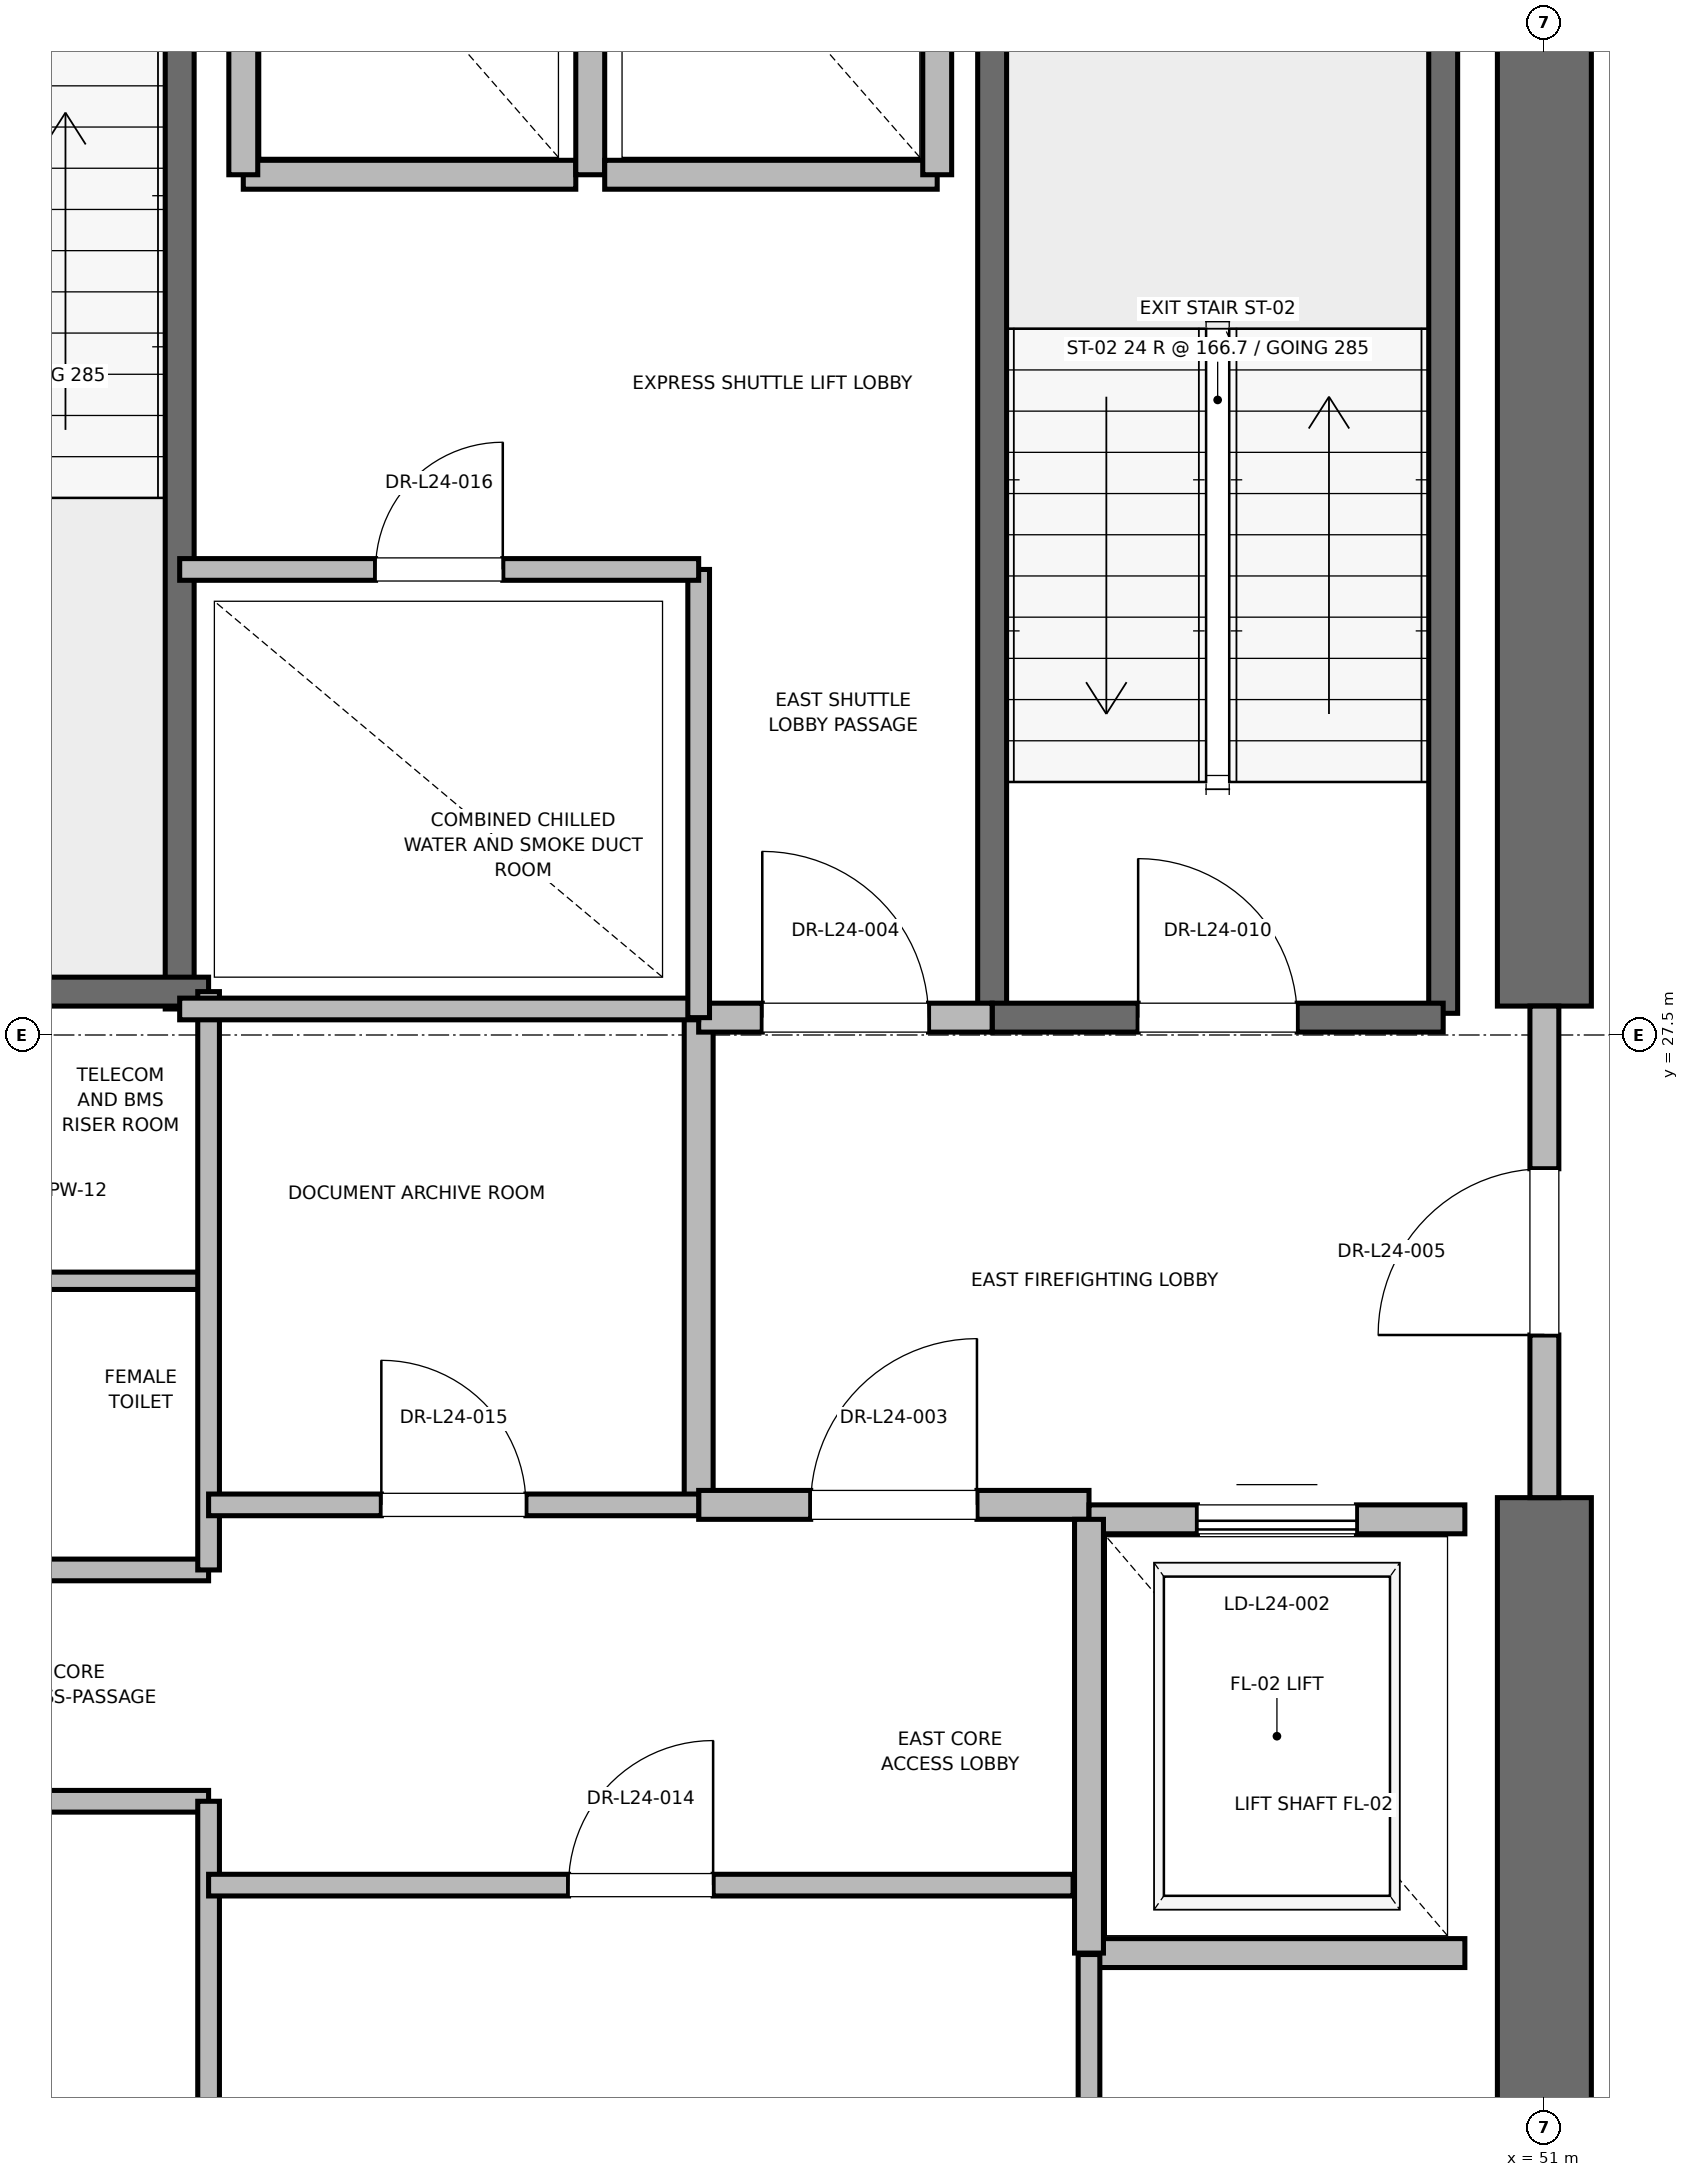
"""IFC4 building model, lengths in metres.
Left out: names, types, materials, properties, quantities, classifications, styles, units other than length and angle.
Written with IfcOpenShell. Run it as: python <this file> out.ifc"""

import sys

from ifc_helpers import new_model, si_unit, direction, frame, frame_2d, origin, place, context, subcontext, project, spatial, rectangle, extrude, element, fill, save


model = new_model("IFC4")
c1 = context("Model", 3, precision=1e-05, world=origin(), true_north=direction((0.0, 1.0)))
c2 = subcontext(c1, "Body", "Model", "MODEL_VIEW")
j1 = project(units=[si_unit("LENGTHUNIT", "METRE"), si_unit("PLANEANGLEUNIT", "RADIAN")], contexts=[c1])
p1 = place(None, origin())
s1 = spatial("IfcSite", under=j1, at=p1, CompositionType="ELEMENT")
p2 = place(p1, origin())
s2 = spatial("IfcBuilding", under=s1, at=p2, CompositionType="ELEMENT")
p3 = place(p2, frame((0.0, 0.0, 103.6)))
s3 = spatial("IfcBuildingStorey", under=s2, at=p3, CompositionType="ELEMENT", Elevation=103.6)
p4 = place(p3, frame((51.0, 18.5, 0.0), z_axis=(0.0, 0.0, 1.0), x_axis=(0.0, 1.0, 0.0)))
e1 = element("IfcWall", 1, at=p4, inside=s3, PredefinedType="SHEAR", context=c2, shape_type="SweptSolid", body=[
    extrude(rectangle(XDim=5.8, YDim=0.65, at=frame_2d((2.9, 0.0))), origin(), (0.0, 0.0, 1.0), 3.7),
])
p5 = place(p3, frame((51.0, 27.7, 0.0), z_axis=(0.0, 0.0, 1.0), x_axis=(0.0, 1.0, 0.0)))
e2 = element("IfcWall", 2, at=p5, inside=s3, PredefinedType="SHEAR", context=c2, shape_type="SweptSolid", body=[
    extrude(rectangle(XDim=8.8, YDim=0.65, at=frame_2d((4.4, 0.0))), origin(), (0.0, 0.0, 1.0), 3.7),
])
p6 = place(p3, frame((50.3, 27.65, 0.0), z_axis=(0.0, 0.0, 1.0), x_axis=(0.0, 1.0, 0.0)))
e3 = element("IfcWall", 3, at=p6, inside=s3, PredefinedType="SOLIDWALL", context=c2, shape_type="SweptSolid", body=[
    extrude(rectangle(XDim=8.15, YDim=0.2, at=frame_2d((4.075, 0.0))), origin(), (0.0, 0.0, 1.0), 3.7),
])
p7 = place(p3, frame((47.18, 27.62, 0.0), z_axis=(0.0, 0.0, 1.0), x_axis=(0.0, 1.0, 0.0)))
e4 = element("IfcWall", 4, at=p7, inside=s3, PredefinedType="SOLIDWALL", context=c2, shape_type="SweptSolid", body=[
    extrude(rectangle(XDim=8.18, YDim=0.2, at=frame_2d((4.09, 0.0))), origin(), (0.0, 0.0, 1.0), 3.7),
])
p8 = place(p3, frame((47.18, 27.62, 0.0), z_axis=(0.0, 0.0, 1.0), x_axis=(1.0, 0.0, 0.0)))
e5 = element("IfcWall", 5, at=p8, inside=s3, PredefinedType="SOLIDWALL", context=c2, shape_type="SweptSolid", body=[
    extrude(rectangle(XDim=3.12, YDim=0.2, at=frame_2d((1.56, 0.0))), origin(), (0.0, 0.0, 1.0), 3.7),
])
p9 = place(p8, frame((1.01, 0.0, 0.0)))
e6 = element("IfcOpeningElement", 6, at=p9, cuts=e5, PredefinedType="OPENING", context=c2, shape_type="SweptSolid", body=[
    extrude(rectangle(XDim=1.1, YDim=2.15, at=frame_2d((0.55, 1.075))), frame((0.0, 0.1, 0.0), z_axis=(0.0, -1.0, 0.0), x_axis=(1.0, 0.0, 0.0)), (0.0, 0.0, 1.0), 0.2),
])
p10 = place(p3, frame((41.56, 27.68, 0.0), z_axis=(0.0, 0.0, 1.0), x_axis=(0.0, 1.0, 0.0)))
e7 = element("IfcWall", 7, at=p10, inside=s3, PredefinedType="SOLIDWALL", context=c2, shape_type="SweptSolid", body=[
    extrude(rectangle(XDim=8.57, YDim=0.2, at=frame_2d((4.285, 0.0))), origin(), (0.0, 0.0, 1.0), 3.7),
])
p11 = place(p3, frame((38.44, 27.8, 0.0), z_axis=(0.0, 0.0, 1.0), x_axis=(1.0, 0.0, 0.0)))
e8 = element("IfcWall", 8, at=p11, inside=s3, PredefinedType="SOLIDWALL", context=c2, shape_type="SweptSolid", body=[
    extrude(rectangle(XDim=3.32, YDim=0.2, at=frame_2d((1.66, 0.0))), origin(), (0.0, 0.0, 1.0), 3.7),
])
p12 = place(p3, frame((45.15, 24.25, 0.0), z_axis=(0.0, 0.0, 1.0), x_axis=(0.0, 1.0, 0.0)))
e9 = element("IfcWall", 9, at=p12, inside=s3, PredefinedType="PARTITIONING", context=c2, shape_type="SweptSolid", body=[
    extrude(rectangle(XDim=3.37, YDim=0.2, at=frame_2d((1.685, 0.0))), origin(), (0.0, 0.0, 1.0), 3.7),
])
p13 = place(p3, frame((45.15, 24.25, 0.0), z_axis=(0.0, 0.0, 1.0), x_axis=(1.0, 0.0, 0.0)))
e10 = element("IfcWall", 10, at=p13, inside=s3, PredefinedType="PARTITIONING", context=c2, shape_type="SweptSolid", body=[
    extrude(rectangle(XDim=2.7, YDim=0.2, at=frame_2d((1.35, 0.0))), origin(), (0.0, 0.0, 1.0), 3.7),
])
p14 = place(p13, frame((0.775, 0.0, 0.0)))
e11 = element("IfcOpeningElement", 11, at=p14, cuts=e10, PredefinedType="OPENING", context=c2, shape_type="SweptSolid", body=[
    extrude(rectangle(XDim=1.15, YDim=2.2, at=frame_2d((0.575, 1.1))), frame((0.0, 0.1, 0.0), z_axis=(0.0, -1.0, 0.0), x_axis=(1.0, 0.0, 0.0)), (0.0, 0.0, 1.0), 0.2),
])
p15 = place(p3, frame((45.15, 27.62, 0.0), z_axis=(0.0, 0.0, 1.0), x_axis=(1.0, 0.0, 0.0)))
e12 = element("IfcWall", 12, at=p15, inside=s3, PredefinedType="PARTITIONING", context=c2, shape_type="SweptSolid", body=[
    extrude(rectangle(XDim=2.03, YDim=0.2, at=frame_2d((1.015, 0.0))), origin(), (0.0, 0.0, 1.0), 3.7),
])
p16 = place(p15, frame((0.44, 0.0, 0.0)))
e13 = element("IfcOpeningElement", 13, at=p16, cuts=e12, PredefinedType="OPENING", context=c2, shape_type="SweptSolid", body=[
    extrude(rectangle(XDim=1.15, YDim=2.2, at=frame_2d((0.575, 1.1))), frame((0.0, 0.1, 0.0), z_axis=(0.0, -1.0, 0.0), x_axis=(1.0, 0.0, 0.0)), (0.0, 0.0, 1.0), 0.2),
])
p17 = place(p3, frame((51.0, 24.3, 0.0), z_axis=(0.0, 0.0, 1.0), x_axis=(0.0, 1.0, 0.0)))
e14 = element("IfcWall", 14, at=p17, inside=s3, PredefinedType="PARTITIONING", context=c2, shape_type="SweptSolid", body=[
    extrude(rectangle(XDim=3.4, YDim=0.2, at=frame_2d((1.7, 0.0))), origin(), (0.0, 0.0, 1.0), 2.48),
])
p18 = place(p17, frame((1.125, 0.0, 0.0)))
e15 = element("IfcOpeningElement", 15, at=p18, cuts=e14, PredefinedType="OPENING", context=c2, shape_type="SweptSolid", body=[
    extrude(rectangle(XDim=1.15, YDim=2.2, at=frame_2d((0.575, 1.1))), frame((0.0, 0.1, 0.0), z_axis=(0.0, -1.0, 0.0), x_axis=(1.0, 0.0, 0.0)), (0.0, 0.0, 1.0), 0.2),
])
p19 = place(p3, frame((47.85, 21.15, 0.0), z_axis=(0.0, 0.0, 1.0), x_axis=(1.0, 0.0, 0.0)))
e16 = element("IfcWall", 16, at=p19, inside=s3, PredefinedType="SOLIDWALL", context=c2, shape_type="SweptSolid", body=[
    extrude(rectangle(XDim=2.6, YDim=0.2, at=frame_2d((1.3, 0.0))), origin(), (0.0, 0.0, 1.0), 3.7),
])
p20 = place(p3, frame((50.45, 24.15, 0.0), z_axis=(0.0, 0.0, 1.0), x_axis=(-1.0, 0.0, 0.0)))
e17 = element("IfcWall", 17, at=p20, inside=s3, PredefinedType="SOLIDWALL", context=c2, shape_type="SweptSolid", body=[
    extrude(rectangle(XDim=2.6, YDim=0.2, at=frame_2d((1.3, 0.0))), origin(), (0.0, 0.0, 1.0), 2.48),
])
p21 = place(p20, frame((0.75, 0.0, 0.0)))
e18 = element("IfcOpeningElement", 18, at=p21, cuts=e17, PredefinedType="OPENING", context=c2, shape_type="SweptSolid", body=[
    extrude(rectangle(XDim=1.1, YDim=2.2, at=frame_2d((0.55, 1.1))), frame((0.0, 0.1, 0.0), z_axis=(0.0, -1.0, 0.0), x_axis=(1.0, 0.0, 0.0)), (0.0, 0.0, 1.0), 0.2),
])
p22 = place(p3, frame((47.85, 24.15, 0.0), z_axis=(0.0, 0.0, 1.0), x_axis=(0.0, -1.0, 0.0)))
e19 = element("IfcWall", 19, at=p22, inside=s3, PredefinedType="SOLIDWALL", context=c2, shape_type="SweptSolid", body=[
    extrude(rectangle(XDim=3.0, YDim=0.2, at=frame_2d((1.5, 0.0))), origin(), (0.0, 0.0, 1.0), 3.7),
])
p23 = place(p3, frame((42.0, 33.45, 0.0), z_axis=(0.0, 0.0, 1.0), x_axis=(1.0, 0.0, 0.0)))
e20 = element("IfcWall", 20, at=p23, inside=s3, PredefinedType="SOLIDWALL", context=c2, shape_type="SweptSolid", body=[
    extrude(rectangle(XDim=2.3, YDim=0.2, at=frame_2d((1.15, 0.0))), origin(), (0.0, 0.0, 1.0), 3.7),
])
for number, where, z_axis, x_axis in (
    (21, (42.0, 36.05, 0.0), (0.0, 0.0, 1.0), (0.0, -1.0, 0.0)),
    (22, (44.4, 33.45, 0.0), (0.0, 0.0, 1.0), (0.0, 1.0, 0.0)),
):
    element("IfcWall", number, at=place(p3, frame(where, z_axis=z_axis, x_axis=x_axis)), inside=s3, PredefinedType="SOLIDWALL", context=c2, shape_type="SweptSolid", body=[
        extrude(rectangle(XDim=2.6, YDim=0.2, at=frame_2d((1.3, 0.0))), origin(), (0.0, 0.0, 1.0), 2.48),
    ])
p24 = place(p3, frame((44.5, 33.45, 0.0), z_axis=(0.0, 0.0, 1.0), x_axis=(1.0, 0.0, 0.0)))
e23 = element("IfcWall", 23, at=p24, inside=s3, PredefinedType="SOLIDWALL", context=c2, shape_type="SweptSolid", body=[
    extrude(rectangle(XDim=2.3, YDim=0.2, at=frame_2d((1.15, 0.0))), origin(), (0.0, 0.0, 1.0), 3.7),
])
p25 = place(p3, frame((46.8, 33.45, 0.0), z_axis=(0.0, 0.0, 1.0), x_axis=(0.0, 1.0, 0.0)))
e24 = element("IfcWall", 24, at=p25, inside=s3, PredefinedType="SOLIDWALL", context=c2, shape_type="SweptSolid", body=[
    extrude(rectangle(XDim=2.6, YDim=0.2, at=frame_2d((1.3, 0.0))), origin(), (0.0, 0.0, 1.0), 3.7),
])
for number, where, z_axis, x_axis in (
    (25, (39.95, 22.2, 0.0), (0.0, 0.0, 1.0), (1.0, 0.0, 0.0)),
    (26, (39.95, 23.8, 0.0), (0.0, 0.0, 1.0), (1.0, 0.0, 0.0)),
):
    element("IfcWall", number, at=place(p3, frame(where, z_axis=z_axis, x_axis=x_axis)), inside=s3, PredefinedType="PARTITIONING", context=c2, shape_type="SweptSolid", body=[
        extrude(rectangle(XDim=1.81, YDim=0.15, at=frame_2d((0.905, 0.0))), origin(), (0.0, 0.0, 1.0), 2.85),
    ])
p26 = place(p3, frame((39.95, 25.8, 0.0), z_axis=(0.0, 0.0, 1.0), x_axis=(1.0, 0.0, 0.0)))
e27 = element("IfcWall", 27, at=p26, inside=s3, PredefinedType="PARTITIONING", context=c2, shape_type="SweptSolid", body=[
    extrude(rectangle(XDim=1.81, YDim=0.12, at=frame_2d((0.905, 0.0))), origin(), (0.0, 0.0, 1.0), 2.85),
])
p27 = place(p3, frame((41.76, 18.6, 0.0), z_axis=(0.0, 0.0, 1.0), x_axis=(0.0, 1.0, 0.0)))
e28 = element("IfcWall", 28, at=p27, inside=s3, PredefinedType="PARTITIONING", context=c2, shape_type="SweptSolid", body=[
    extrude(rectangle(XDim=3.6, YDim=0.15, at=frame_2d((1.8, 0.0))), origin(), (0.0, 0.0, 1.0), 2.48),
])
p28 = place(p3, frame((41.76, 23.8, 0.0), z_axis=(0.0, 0.0, 1.0), x_axis=(0.0, 1.0, 0.0)))
e29 = element("IfcWall", 29, at=p28, inside=s3, PredefinedType="PARTITIONING", context=c2, shape_type="SweptSolid", body=[
    extrude(rectangle(XDim=4.0, YDim=0.15, at=frame_2d((2.0, 0.0))), origin(), (0.0, 0.0, 1.0), 2.85),
])
p29 = place(p3, frame((41.56, 27.68, 0.0), z_axis=(0.0, 0.0, 1.0), x_axis=(1.0, 0.0, 0.0)))
e30 = element("IfcWall", 30, at=p29, inside=s3, PredefinedType="PARTITIONING", context=c2, shape_type="SweptSolid", body=[
    extrude(rectangle(XDim=3.59, YDim=0.15, at=frame_2d((1.795, 0.0))), origin(), (0.0, 0.0, 1.0), 2.85),
])
p30 = place(p3, frame((47.85, 18.6, 0.0), z_axis=(0.0, 0.0, 1.0), x_axis=(0.0, 1.0, 0.0)))
e31 = element("IfcWall", 31, at=p30, inside=s3, PredefinedType="PARTITIONING", context=c2, shape_type="SweptSolid", body=[
    extrude(rectangle(XDim=2.54, YDim=0.15, at=frame_2d((1.27, 0.0))), origin(), (0.0, 0.0, 1.0), 2.85),
])
p31 = place(p3, frame((41.76, 21.62, 0.0), z_axis=(0.0, 0.0, 1.0), x_axis=(1.0, 0.0, 0.0)))
e32 = element("IfcWall", 32, at=p31, inside=s3, PredefinedType="PARTITIONING", context=c2, shape_type="SweptSolid", body=[
    extrude(rectangle(XDim=5.98, YDim=0.15, at=frame_2d((2.99, 0.0))), origin(), (0.0, 0.0, 1.0), 2.85),
])
p32 = place(p31, frame((2.49, 0.0, 0.0)))
e33 = element("IfcOpeningElement", 33, at=p32, cuts=e32, PredefinedType="OPENING", context=c2, shape_type="SweptSolid", body=[
    extrude(rectangle(XDim=1.0, YDim=2.15, at=frame_2d((0.5, 1.075))), frame((0.0, 0.075, 0.0), z_axis=(0.0, -1.0, 0.0), x_axis=(1.0, 0.0, 0.0)), (0.0, 0.0, 1.0), 0.15),
])
p33 = place(p3, frame((41.76, 24.25, 0.0), z_axis=(0.0, 0.0, 1.0), x_axis=(1.0, 0.0, 0.0)))
e34 = element("IfcWall", 34, at=p33, inside=s3, PredefinedType="PARTITIONING", context=c2, shape_type="SweptSolid", body=[
    extrude(rectangle(XDim=3.39, YDim=0.15, at=frame_2d((1.695, 0.0))), origin(), (0.0, 0.0, 1.0), 2.85),
])
p34 = place(p33, frame((1.195, 0.0, 0.0)))
e35 = element("IfcOpeningElement", 35, at=p34, cuts=e34, PredefinedType="OPENING", context=c2, shape_type="SweptSolid", body=[
    extrude(rectangle(XDim=1.0, YDim=2.15, at=frame_2d((0.5, 1.075))), frame((0.0, 0.075, 0.0), z_axis=(0.0, -1.0, 0.0), x_axis=(1.0, 0.0, 0.0)), (0.0, 0.0, 1.0), 0.15),
])
p35 = place(p3, frame((45.15, 27.62, 0.0), z_axis=(0.0, 0.0, 1.0), x_axis=(0.0, 1.0, 0.0)))
e36 = element("IfcWall", 36, at=p35, inside=s3, PredefinedType="PARTITIONING", context=c2, shape_type="SweptSolid", body=[
    extrude(rectangle(XDim=3.1, YDim=0.15, at=frame_2d((1.55, 0.0))), origin(), (0.0, 0.0, 1.0), 2.85),
])
p36 = place(p3, frame((41.56, 30.72, 0.0), z_axis=(0.0, 0.0, 1.0), x_axis=(1.0, 0.0, 0.0)))
e37 = element("IfcWall", 37, at=p36, inside=s3, PredefinedType="PARTITIONING", context=c2, shape_type="SweptSolid", body=[
    extrude(rectangle(XDim=3.59, YDim=0.15, at=frame_2d((1.795, 0.0))), origin(), (0.0, 0.0, 1.0), 2.85),
])
p37 = place(p36, frame((1.355, 0.0, 0.0)))
e38 = element("IfcOpeningElement", 38, at=p37, cuts=e37, PredefinedType="OPENING", context=c2, shape_type="SweptSolid", body=[
    extrude(rectangle(XDim=0.88, YDim=2.1, at=frame_2d((0.44, 1.05))), frame((0.0, 0.075, 0.0), z_axis=(0.0, -1.0, 0.0), x_axis=(1.0, 0.0, 0.0)), (0.0, 0.0, 1.0), 0.15),
])
p38 = place(p9, origin())
e39 = element("IfcDoor", 39, at=p38, inside=s3, OperationType="SINGLE_SWING_LEFT", PredefinedType="DOOR", context=c2, shape_type="SweptSolid", body=[
    extrude(rectangle(XDim=1.1, YDim=2.15, at=frame_2d((0.55, 1.075))), frame((0.0, 0.025, 0.0), z_axis=(0.0, -1.0, 0.0), x_axis=(1.0, 0.0, 0.0)), (0.0, 0.0, 1.0), 0.05),
])
fill(e6, e39)
p39 = place(p14, origin())
e40 = element("IfcDoor", 40, at=p39, inside=s3, OperationType="SINGLE_SWING_RIGHT", PredefinedType="DOOR", context=c2, shape_type="SweptSolid", body=[
    extrude(rectangle(XDim=1.15, YDim=2.2, at=frame_2d((0.575, 1.1))), frame((0.0, 0.025, 0.0), z_axis=(0.0, -1.0, 0.0), x_axis=(1.0, 0.0, 0.0)), (0.0, 0.0, 1.0), 0.05),
])
fill(e11, e40)
p40 = place(p16, origin())
e41 = element("IfcDoor", 41, at=p40, inside=s3, OperationType="SINGLE_SWING_LEFT", PredefinedType="DOOR", context=c2, shape_type="SweptSolid", body=[
    extrude(rectangle(XDim=1.15, YDim=2.2, at=frame_2d((0.575, 1.1))), frame((0.0, 0.025, 0.0), z_axis=(0.0, -1.0, 0.0), x_axis=(1.0, 0.0, 0.0)), (0.0, 0.0, 1.0), 0.05),
])
fill(e13, e41)
p41 = place(p18, origin())
e42 = element("IfcDoor", 42, at=p41, inside=s3, OperationType="SINGLE_SWING_LEFT", PredefinedType="DOOR", context=c2, shape_type="SweptSolid", body=[
    extrude(rectangle(XDim=1.15, YDim=2.2, at=frame_2d((0.575, 1.1))), frame((0.0, 0.025, 0.0), z_axis=(0.0, -1.0, 0.0), x_axis=(1.0, 0.0, 0.0)), (0.0, 0.0, 1.0), 0.05),
])
fill(e15, e42)
p42 = place(p21, origin())
e43 = element("IfcDoor", 43, at=p42, inside=s3, OperationType="SLIDING_TO_RIGHT", PredefinedType="DOOR", context=c2, shape_type="SweptSolid", body=[
    extrude(rectangle(XDim=1.1, YDim=2.2, at=frame_2d((0.55, 1.1))), frame((0.0, 0.025, 0.0), z_axis=(0.0, -1.0, 0.0), x_axis=(1.0, 0.0, 0.0)), (0.0, 0.0, 1.0), 0.05),
])
fill(e18, e43)
p43 = place(p32, origin())
e44 = element("IfcDoor", 44, at=p43, inside=s3, OperationType="SINGLE_SWING_RIGHT", PredefinedType="DOOR", context=c2, shape_type="SweptSolid", body=[
    extrude(rectangle(XDim=1.0, YDim=2.15, at=frame_2d((0.5, 1.075))), frame((0.0, 0.025, 0.0), z_axis=(0.0, -1.0, 0.0), x_axis=(1.0, 0.0, 0.0)), (0.0, 0.0, 1.0), 0.05),
])
fill(e33, e44)
p44 = place(p34, origin())
e45 = element("IfcDoor", 45, at=p44, inside=s3, OperationType="SINGLE_SWING_LEFT", PredefinedType="DOOR", context=c2, shape_type="SweptSolid", body=[
    extrude(rectangle(XDim=1.0, YDim=2.15, at=frame_2d((0.5, 1.075))), frame((0.0, 0.025, 0.0), z_axis=(0.0, -1.0, 0.0), x_axis=(1.0, 0.0, 0.0)), (0.0, 0.0, 1.0), 0.05),
])
fill(e35, e45)
p45 = place(p37, origin())
e46 = element("IfcDoor", 46, at=p45, inside=s3, OperationType="SINGLE_SWING_RIGHT", PredefinedType="DOOR", context=c2, shape_type="SweptSolid", body=[
    extrude(rectangle(XDim=0.88, YDim=2.1, at=frame_2d((0.44, 1.05))), frame((0.0, 0.025, 0.0), z_axis=(0.0, -1.0, 0.0), x_axis=(1.0, 0.0, 0.0)), (0.0, 0.0, 1.0), 0.05),
])
fill(e38, e46)
save(model, sys.argv[1])
